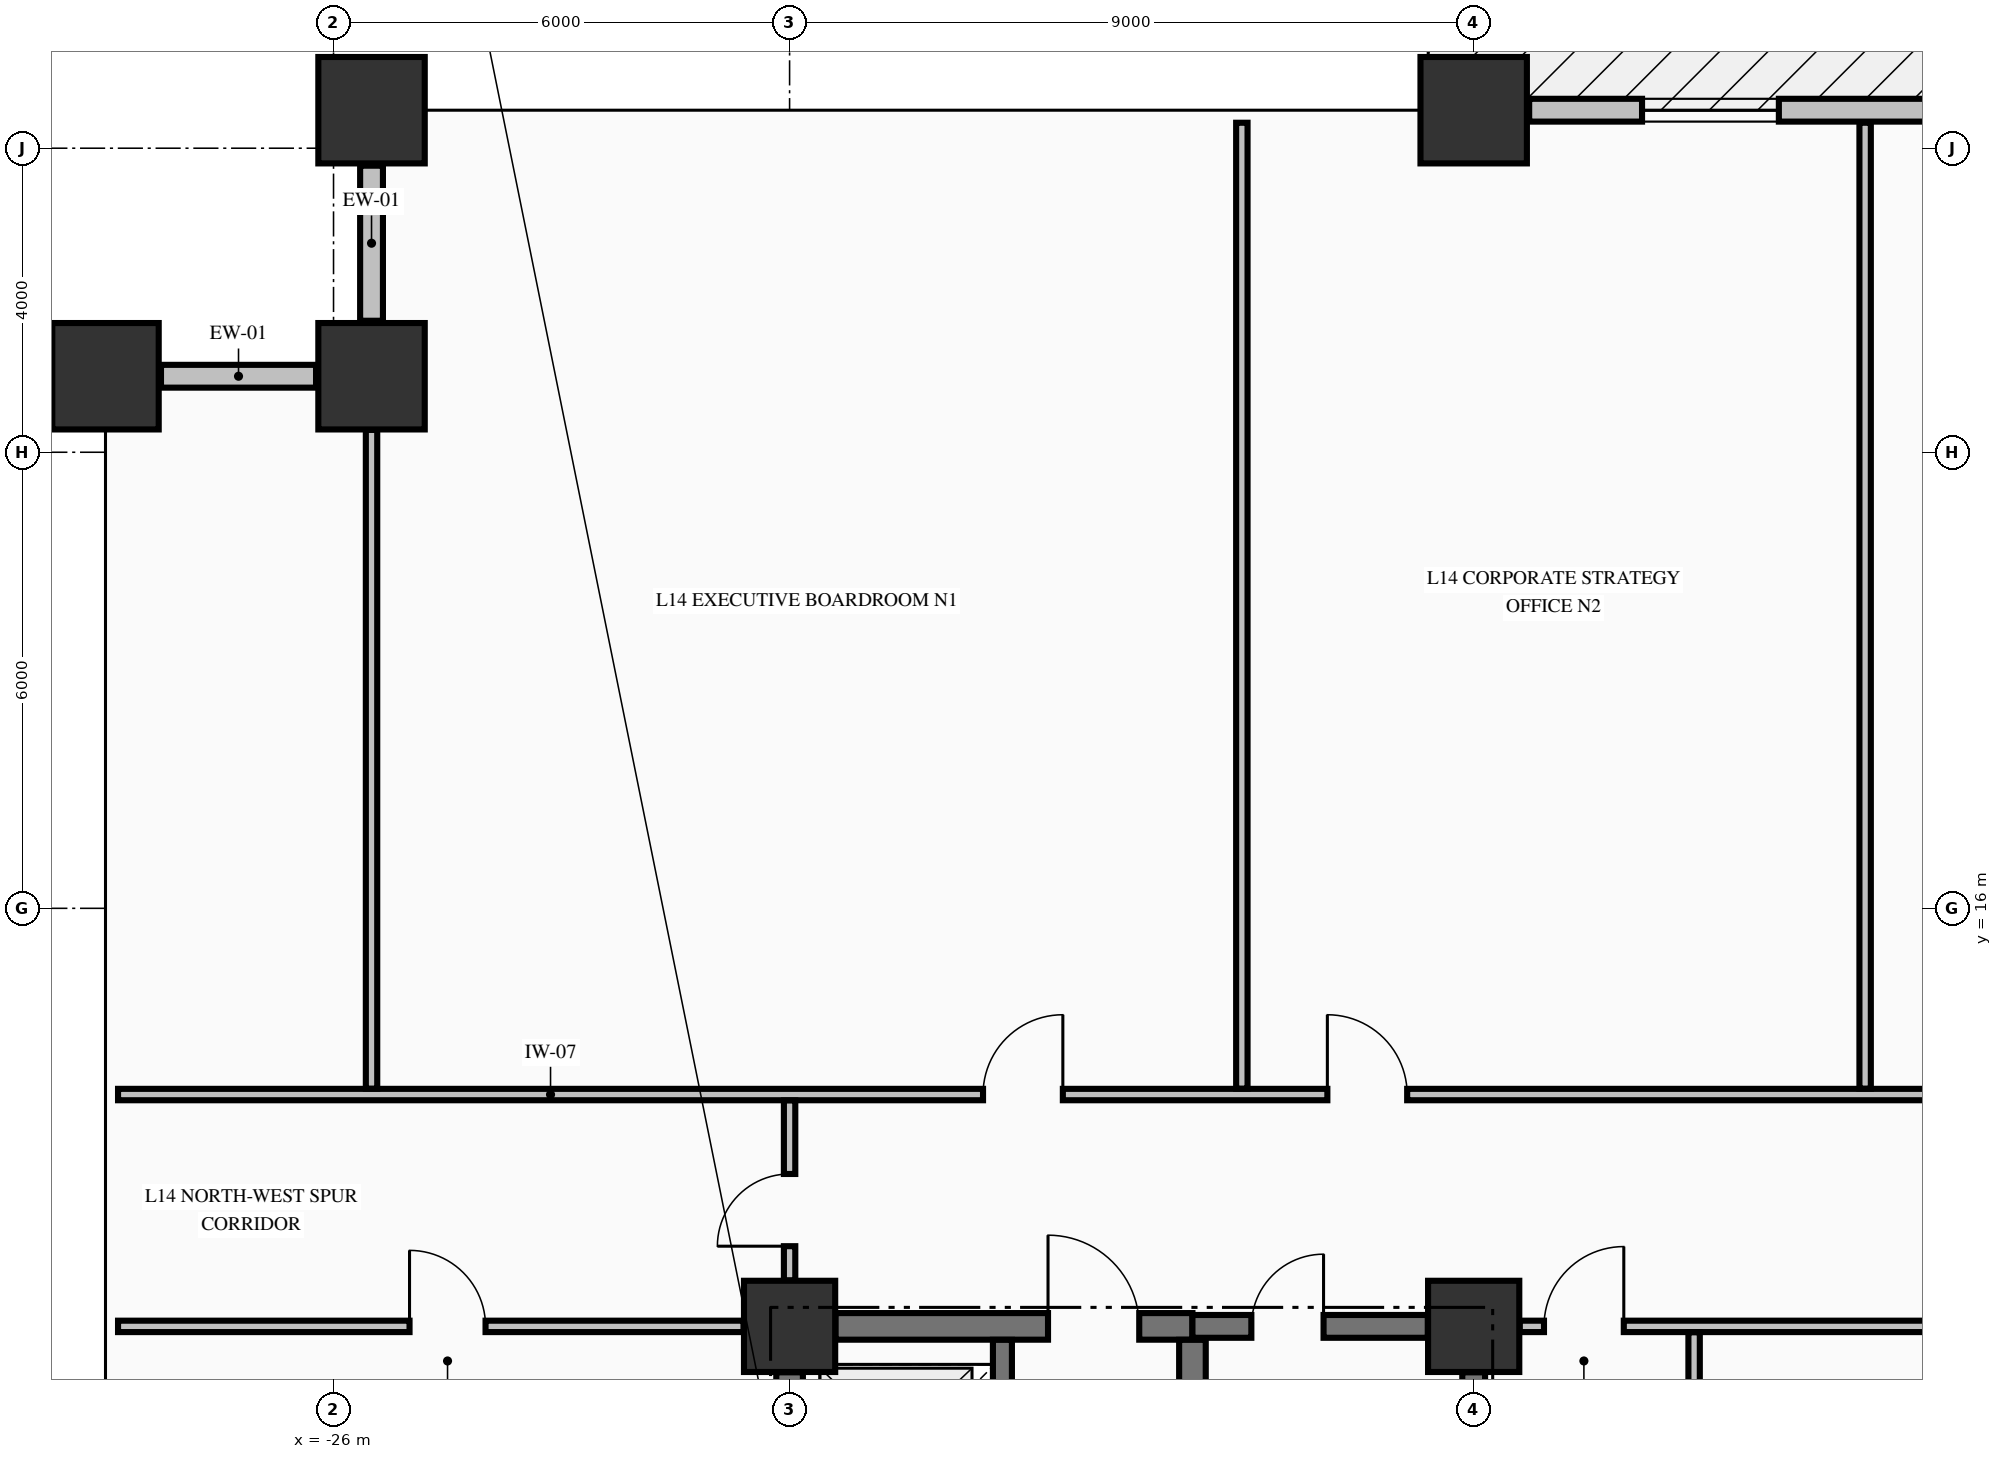
"""IFC4 building model, lengths in metres.
Left out: names, types, materials, properties, quantities, classifications, styles, units other than length and angle.
Written with IfcOpenShell. Run it as: python <this file> out.ifc"""

import sys

from ifc_helpers import new_model, si_unit, direction, frame, frame_2d, origin, origin_2d, place, context, subcontext, project, spatial, rectangle, extrude, element, fill, save


model = new_model("IFC4")
c1 = context("Model", 3, precision=1e-05, world=origin(), true_north=direction((0.0, 1.0)))
c2 = subcontext(c1, "Body", "Model", "MODEL_VIEW")
j1 = project(units=[si_unit("LENGTHUNIT", "METRE"), si_unit("PLANEANGLEUNIT", "RADIAN")], contexts=[c1])
p1 = place(None, origin())
s1 = spatial("IfcSite", under=j1, at=p1, CompositionType="ELEMENT")
p2 = place(p1, origin())
s2 = spatial("IfcBuilding", under=s1, at=p2, CompositionType="ELEMENT")
p3 = place(p2, frame((0.0, 0.0, 60.76)))
s3 = spatial("IfcBuildingStorey", under=s2, at=p3, CompositionType="ELEMENT", Elevation=60.76)
for number, where, z_axis, x_axis in (
    (1, (-25.5, 26.5, -0.3), (0.0, 0.0, 1.0), (1.0, 0.0, 0.0)),
    (2, (-11.0, 26.5, -0.3), (0.0, 0.0, 1.0), (1.0, 0.0, 0.0)),
    (3, (-29.0, 23.0, -0.3), (0.0, 0.0, 1.0), (1.0, 0.0, 0.0)),
    (4, (-25.5, 23.0, -0.3), (0.0, 0.0, 1.0), (1.0, 0.0, 0.0)),
):
    element("IfcColumn", number, at=place(p3, frame(where, z_axis=z_axis, x_axis=x_axis)), inside=s3, PredefinedType="COLUMN", context=c2, shape_type="SweptSolid", body=[
        extrude(rectangle(XDim=1.4, YDim=1.4, at=origin_2d()), origin(), (0.0, 0.0, 1.0), 3.62),
    ])
for number, where, z_axis, x_axis in (
    (5, (-20.0, 10.5, -0.3), (0.0, 0.0, 1.0), (1.0, 0.0, 0.0)),
    (6, (-11.0, 10.5, -0.3), (0.0, 0.0, 1.0), (1.0, 0.0, 0.0)),
):
    element("IfcColumn", number, at=place(p3, frame(where, z_axis=z_axis, x_axis=x_axis)), inside=s3, PredefinedType="COLUMN", context=c2, shape_type="SweptSolid", body=[
        extrude(rectangle(XDim=1.2, YDim=1.2, at=origin_2d()), origin(), (0.0, 0.0, 1.0), 3.62),
    ])
for number, where, z_axis, x_axis in (
    (7, (-25.5, 25.77, 0.0), (0.0, 0.0, 1.0), (0.0, -1.0, 0.0)),
    (8, (-26.23, 23.0, 0.0), (0.0, 0.0, 1.0), (-1.0, 0.0, 0.0)),
):
    element("IfcWall", number, at=place(p3, frame(where, z_axis=z_axis, x_axis=x_axis)), inside=s3, PredefinedType="STANDARD", context=c2, shape_type="SweptSolid", body=[
        extrude(rectangle(XDim=2.04, YDim=0.3, at=frame_2d((1.02, 0.0))), origin(), (0.0, 0.0, 1.0), 1.512),
    ])
p4 = place(p3, frame((-0.73, 26.5, 0.0), z_axis=(0.0, 0.0, 1.0), x_axis=(-1.0, 0.0, 0.0)))
e9 = element("IfcWall", 9, at=p4, inside=s3, PredefinedType="STANDARD", context=c2, shape_type="SweptSolid", body=[
    extrude(rectangle(XDim=9.54, YDim=0.3, at=frame_2d((4.77, 0.0))), origin(), (0.0, 0.0, 1.0), 2.712),
])
p5 = place(p4, frame((0.535, 0.0, 0.0)))
e10 = element("IfcOpeningElement", 10, at=p5, cuts=e9, PredefinedType="OPENING", context=c2, shape_type="SweptSolid", body=[
    extrude(rectangle(XDim=1.1, YDim=2.15, at=frame_2d((0.55, 1.075))), frame((0.0, 0.16, 0.0), z_axis=(0.0, -1.0, 0.0), x_axis=(1.0, 0.0, 0.0)), (0.0, 0.0, 1.0), 0.32),
])
p6 = place(p4, frame((6.255, 0.0, 0.78)))
e11 = element("IfcOpeningElement", 11, at=p6, cuts=e9, PredefinedType="OPENING", context=c2, shape_type="SweptSolid", body=[
    extrude(rectangle(XDim=1.8, YDim=1.72, at=frame_2d((0.9, 0.86))), frame((0.0, 0.16, 0.0), z_axis=(0.0, -1.0, 0.0), x_axis=(1.0, 0.0, 0.0)), (0.0, 0.0, 1.0), 0.32),
])
p7 = place(p3, frame((-19.396, 10.5, 0.0), z_axis=(0.0, 0.0, 1.0), x_axis=(1.0, 0.0, 0.0)))
e12 = element("IfcWall", 12, at=p7, inside=s3, PredefinedType="SHEAR", context=c2, shape_type="SweptSolid", body=[
    extrude(rectangle(XDim=4.696, YDim=0.35, at=frame_2d((2.348, 0.0))), origin(), (0.0, 0.0, 1.0), 3.32),
])
p8 = place(p7, frame((2.796, 0.0, 0.0)))
e13 = element("IfcOpeningElement", 13, at=p8, cuts=e12, PredefinedType="OPENING", context=c2, shape_type="SweptSolid", body=[
    extrude(rectangle(XDim=1.2, YDim=2.15, at=frame_2d((0.6, 1.075))), frame((0.0, 0.185, 0.0), z_axis=(0.0, -1.0, 0.0), x_axis=(1.0, 0.0, 0.0)), (0.0, 0.0, 1.0), 0.37),
])
p9 = place(p3, frame((-14.7, 10.5, 0.0), z_axis=(0.0, 0.0, 1.0), x_axis=(1.0, 0.0, 0.0)))
e14 = element("IfcWall", 14, at=p9, inside=s3, PredefinedType="SHEAR", context=c2, shape_type="SweptSolid", body=[
    extrude(rectangle(XDim=3.096, YDim=0.3, at=frame_2d((1.548, 0.0))), origin(), (0.0, 0.0, 1.0), 3.32),
])
p10 = place(p9, frame((0.775, 0.0, 0.0)))
e15 = element("IfcOpeningElement", 15, at=p10, cuts=e14, PredefinedType="OPENING", context=c2, shape_type="SweptSolid", body=[
    extrude(rectangle(XDim=0.95, YDim=2.15, at=frame_2d((0.475, 1.075))), frame((0.0, 0.16, 0.0), z_axis=(0.0, -1.0, 0.0), x_axis=(1.0, 0.0, 0.0)), (0.0, 0.0, 1.0), 0.32),
])
p11 = place(p3, frame((-28.835, 10.5, 0.0), z_axis=(0.0, 0.0, 1.0), x_axis=(1.0, 0.0, 0.0)))
e16 = element("IfcWall", 16, at=p11, inside=s3, PredefinedType="PARTITIONING", context=c2, shape_type="SweptSolid", body=[
    extrude(rectangle(XDim=8.229, YDim=0.15, at=frame_2d((4.115, 0.0))), origin(), (0.0, 0.0, 1.0), 3.32),
])
p12 = place(p11, frame((3.835, 0.0, 0.0)))
e17 = element("IfcOpeningElement", 17, at=p12, cuts=e16, PredefinedType="OPENING", context=c2, shape_type="SweptSolid", body=[
    extrude(rectangle(XDim=1.0, YDim=2.15, at=frame_2d((0.5, 1.075))), frame((0.0, 0.085, 0.0), z_axis=(0.0, -1.0, 0.0), x_axis=(1.0, 0.0, 0.0)), (0.0, 0.0, 1.0), 0.17),
])
p13 = place(p3, frame((-10.394, 10.5, 0.0), z_axis=(0.0, 0.0, 1.0), x_axis=(1.0, 0.0, 0.0)))
e18 = element("IfcWall", 18, at=p13, inside=s3, PredefinedType="PARTITIONING", context=c2, shape_type="SweptSolid", body=[
    extrude(rectangle(XDim=20.788, YDim=0.15, at=frame_2d((10.394, 0.0))), origin(), (0.0, 0.0, 1.0), 3.32),
])
p14 = place(p13, frame((0.319, 0.0, 0.0)))
e19 = element("IfcOpeningElement", 19, at=p14, cuts=e18, PredefinedType="OPENING", context=c2, shape_type="SweptSolid", body=[
    extrude(rectangle(XDim=1.05, YDim=2.15, at=frame_2d((0.525, 1.075))), frame((0.0, 0.085, 0.0), z_axis=(0.0, -1.0, 0.0), x_axis=(1.0, 0.0, 0.0)), (0.0, 0.0, 1.0), 0.17),
])
p15 = place(p13, frame((19.419, 0.0, 0.0)))
e20 = element("IfcOpeningElement", 20, at=p15, cuts=e18, PredefinedType="OPENING", context=c2, shape_type="SweptSolid", body=[
    extrude(rectangle(XDim=1.05, YDim=2.15, at=frame_2d((0.525, 1.075))), frame((0.0, 0.085, 0.0), z_axis=(0.0, -1.0, 0.0), x_axis=(1.0, 0.0, 0.0)), (0.0, 0.0, 1.0), 0.17),
])
p16 = place(p3, frame((-28.835, 13.55, 0.0), z_axis=(0.0, 0.0, 1.0), x_axis=(1.0, 0.0, 0.0)))
e21 = element("IfcWall", 21, at=p16, inside=s3, PredefinedType="PARTITIONING", context=c2, shape_type="SweptSolid", body=[
    extrude(rectangle(XDim=52.67, YDim=0.15, at=frame_2d((26.335, 0.0))), origin(), (0.0, 0.0, 1.0), 3.32),
])
p17 = place(p16, frame((11.38, 0.0, 0.0)))
e22 = element("IfcOpeningElement", 22, at=p17, cuts=e21, PredefinedType="OPENING", context=c2, shape_type="SweptSolid", body=[
    extrude(rectangle(XDim=1.05, YDim=2.15, at=frame_2d((0.525, 1.075))), frame((0.0, 0.085, 0.0), z_axis=(0.0, -1.0, 0.0), x_axis=(1.0, 0.0, 0.0)), (0.0, 0.0, 1.0), 0.17),
])
p18 = place(p16, frame((15.91, 0.0, 0.0)))
e23 = element("IfcOpeningElement", 23, at=p18, cuts=e21, PredefinedType="OPENING", context=c2, shape_type="SweptSolid", body=[
    extrude(rectangle(XDim=1.05, YDim=2.15, at=frame_2d((0.525, 1.075))), frame((0.0, 0.085, 0.0), z_axis=(0.0, -1.0, 0.0), x_axis=(1.0, 0.0, 0.0)), (0.0, 0.0, 1.0), 0.17),
])
p19 = place(p16, frame((26.66, 0.0, 0.0)))
e24 = element("IfcOpeningElement", 24, at=p19, cuts=e21, PredefinedType="OPENING", context=c2, shape_type="SweptSolid", body=[
    extrude(rectangle(XDim=1.05, YDim=2.15, at=frame_2d((0.525, 1.075))), frame((0.0, 0.085, 0.0), z_axis=(0.0, -1.0, 0.0), x_axis=(1.0, 0.0, 0.0)), (0.0, 0.0, 1.0), 0.17),
])
p20 = place(p16, frame((35.56, 0.0, 0.0)))
e25 = element("IfcOpeningElement", 25, at=p20, cuts=e21, PredefinedType="OPENING", context=c2, shape_type="SweptSolid", body=[
    extrude(rectangle(XDim=1.05, YDim=2.15, at=frame_2d((0.525, 1.075))), frame((0.0, 0.085, 0.0), z_axis=(0.0, -1.0, 0.0), x_axis=(1.0, 0.0, 0.0)), (0.0, 0.0, 1.0), 0.17),
])
p21 = place(p16, frame((44.19, 0.0, 0.0)))
e26 = element("IfcOpeningElement", 26, at=p21, cuts=e21, PredefinedType="OPENING", context=c2, shape_type="SweptSolid", body=[
    extrude(rectangle(XDim=1.05, YDim=2.15, at=frame_2d((0.525, 1.075))), frame((0.0, 0.085, 0.0), z_axis=(0.0, -1.0, 0.0), x_axis=(1.0, 0.0, 0.0)), (0.0, 0.0, 1.0), 0.17),
])
p22 = place(p3, frame((-20.0, 7.727, 0.0), z_axis=(0.0, 0.0, 1.0), x_axis=(0.0, 1.0, 0.0)))
e27 = element("IfcWall", 27, at=p22, inside=s3, PredefinedType="SHEAR", context=c2, shape_type="SweptSolid", body=[
    extrude(rectangle(XDim=2.169, YDim=0.35, at=frame_2d((1.084, 0.0))), origin(), (0.0, 0.0, 1.0), 3.32),
])
p23 = place(p3, frame((-17.2, 7.727, 0.0), z_axis=(0.0, 0.0, 1.0), x_axis=(0.0, 1.0, 0.0)))
e28 = element("IfcWall", 28, at=p23, inside=s3, PredefinedType="SOLIDWALL", context=c2, shape_type="SweptSolid", body=[
    extrude(rectangle(XDim=2.596, YDim=0.25, at=frame_2d((1.298, 0.0))), origin(), (0.0, 0.0, 1.0), 3.32),
])
p24 = place(p23, frame((0.773, 0.0, 0.0)))
e29 = element("IfcOpeningElement", 29, at=p24, cuts=e28, PredefinedType="OPENING", context=c2, shape_type="SweptSolid", body=[
    extrude(rectangle(XDim=1.1, YDim=2.2, at=frame_2d((0.55, 1.1))), frame((0.0, 0.135, 0.0), z_axis=(0.0, -1.0, 0.0), x_axis=(1.0, 0.0, 0.0)), (0.0, 0.0, 1.0), 0.27),
])
p25 = place(p3, frame((-14.7, 5.852, 0.0), z_axis=(0.0, 0.0, 1.0), x_axis=(0.0, 1.0, 0.0)))
e30 = element("IfcWall", 30, at=p25, inside=s3, PredefinedType="SHEAR", context=c2, shape_type="SweptSolid", body=[
    extrude(rectangle(XDim=4.471, YDim=0.35, at=frame_2d((2.235, 0.0))), origin(), (0.0, 0.0, 1.0), 3.32),
])
p26 = place(p3, frame((-11.0, 5.852, 0.0), z_axis=(0.0, 0.0, 1.0), x_axis=(0.0, 1.0, 0.0)))
e31 = element("IfcWall", 31, at=p26, inside=s3, PredefinedType="SHEAR", context=c2, shape_type="SweptSolid", body=[
    extrude(rectangle(XDim=4.044, YDim=0.3, at=frame_2d((2.022, 0.0))), origin(), (0.0, 0.0, 1.0), 3.32),
])
p27 = place(p3, frame((-25.5, 13.628, 0.0), z_axis=(0.0, 0.0, 1.0), x_axis=(0.0, 1.0, 0.0)))
e32 = element("IfcWall", 32, at=p27, inside=s3, PredefinedType="PARTITIONING", context=c2, shape_type="SweptSolid", body=[
    extrude(rectangle(XDim=8.666, YDim=0.15, at=frame_2d((4.333, 0.0))), origin(), (0.0, 0.0, 1.0), 3.32),
])
p28 = place(p3, frame((-20.0, 11.106, 0.0), z_axis=(0.0, 0.0, 1.0), x_axis=(0.0, 1.0, 0.0)))
e33 = element("IfcWall", 33, at=p28, inside=s3, PredefinedType="PARTITIONING", context=c2, shape_type="SweptSolid", body=[
    extrude(rectangle(XDim=2.366, YDim=0.15, at=frame_2d((1.183, 0.0))), origin(), (0.0, 0.0, 1.0), 2.66),
])
p29 = place(p28, frame((0.449, 0.0, 0.0)))
e34 = element("IfcOpeningElement", 34, at=p29, cuts=e33, PredefinedType="OPENING", context=c2, shape_type="SweptSolid", body=[
    extrude(rectangle(XDim=0.95, YDim=2.15, at=frame_2d((0.475, 1.075))), frame((0.0, 0.085, 0.0), z_axis=(0.0, -1.0, 0.0), x_axis=(1.0, 0.0, 0.0)), (0.0, 0.0, 1.0), 0.17),
])
p30 = place(p3, frame((-14.05, 13.628, 0.0), z_axis=(0.0, 0.0, 1.0), x_axis=(0.0, 1.0, 0.0)))
e35 = element("IfcWall", 35, at=p30, inside=s3, PredefinedType="PARTITIONING", context=c2, shape_type="SweptSolid", body=[
    extrude(rectangle(XDim=12.707, YDim=0.15, at=frame_2d((6.354, 0.0))), origin(), (0.0, 0.0, 1.0), 3.32),
])
p31 = place(p3, frame((-8.1, -3.897, 0.0), z_axis=(0.0, 0.0, 1.0), x_axis=(0.0, 1.0, 0.0)))
e36 = element("IfcWall", 36, at=p31, inside=s3, PredefinedType="PARTITIONING", context=c2, shape_type="SweptSolid", body=[
    extrude(rectangle(XDim=14.319, YDim=0.15, at=frame_2d((7.16, 0.0))), origin(), (0.0, 0.0, 1.0), 3.32),
])
p32 = place(p31, frame((6.622, 0.0, 0.0)))
e37 = element("IfcOpeningElement", 37, at=p32, cuts=e36, PredefinedType="OPENING", context=c2, shape_type="SweptSolid", body=[
    extrude(rectangle(XDim=1.05, YDim=2.15, at=frame_2d((0.525, 1.075))), frame((0.0, 0.085, 0.0), z_axis=(0.0, -1.0, 0.0), x_axis=(1.0, 0.0, 0.0)), (0.0, 0.0, 1.0), 0.17),
])
p33 = place(p3, frame((-5.85, 13.628, 0.0), z_axis=(0.0, 0.0, 1.0), x_axis=(0.0, 1.0, 0.0)))
e38 = element("IfcWall", 38, at=p33, inside=s3, PredefinedType="PARTITIONING", context=c2, shape_type="SweptSolid", body=[
    extrude(rectangle(XDim=12.707, YDim=0.15, at=frame_2d((6.354, 0.0))), origin(), (0.0, 0.0, 1.0), 3.32),
])
p34 = place(p6, origin())
e39 = element("IfcWindow", 39, at=p34, inside=s3, PartitioningType="SINGLE_PANEL", PredefinedType="WINDOW", context=c2, shape_type="SweptSolid", body=[
    extrude(rectangle(XDim=1.8, YDim=1.72, at=frame_2d((0.9, 0.86))), frame((0.0, 0.03, 0.0), z_axis=(0.0, -1.0, 0.0), x_axis=(1.0, 0.0, 0.0)), (0.0, 0.0, 1.0), 0.06),
])
fill(e11, e39)
p35 = place(p10, origin())
e40 = element("IfcDoor", 40, at=p35, inside=s3, OperationType="SINGLE_SWING_RIGHT", PredefinedType="DOOR", context=c2, shape_type="SweptSolid", body=[
    extrude(rectangle(XDim=0.95, YDim=2.15, at=frame_2d((0.475, 1.075))), frame((0.0, 0.025, 0.0), z_axis=(0.0, -1.0, 0.0), x_axis=(1.0, 0.0, 0.0)), (0.0, 0.0, 1.0), 0.05),
])
fill(e15, e40)
p36 = place(p8, origin())
e41 = element("IfcDoor", 41, at=p36, inside=s3, OperationType="SINGLE_SWING_LEFT", PredefinedType="DOOR", context=c2, shape_type="SweptSolid", body=[
    extrude(rectangle(XDim=1.2, YDim=2.15, at=frame_2d((0.6, 1.075))), frame((0.0, 0.025, 0.0), z_axis=(0.0, -1.0, 0.0), x_axis=(1.0, 0.0, 0.0)), (0.0, 0.0, 1.0), 0.05),
])
fill(e13, e41)
p37 = place(p14, origin())
e42 = element("IfcDoor", 42, at=p37, inside=s3, OperationType="SINGLE_SWING_RIGHT", PredefinedType="DOOR", context=c2, shape_type="SweptSolid", body=[
    extrude(rectangle(XDim=1.05, YDim=2.15, at=frame_2d((0.525, 1.075))), frame((0.0, 0.025, 0.0), z_axis=(0.0, -1.0, 0.0), x_axis=(1.0, 0.0, 0.0)), (0.0, 0.0, 1.0), 0.05),
])
fill(e19, e42)
p38 = place(p17, origin())
e43 = element("IfcDoor", 43, at=p38, inside=s3, OperationType="SINGLE_SWING_RIGHT", PredefinedType="DOOR", context=c2, shape_type="SweptSolid", body=[
    extrude(rectangle(XDim=1.05, YDim=2.15, at=frame_2d((0.525, 1.075))), frame((0.0, 0.025, 0.0), z_axis=(0.0, -1.0, 0.0), x_axis=(1.0, 0.0, 0.0)), (0.0, 0.0, 1.0), 0.05),
])
fill(e22, e43)
p39 = place(p18, origin())
e44 = element("IfcDoor", 44, at=p39, inside=s3, OperationType="SINGLE_SWING_LEFT", PredefinedType="DOOR", context=c2, shape_type="SweptSolid", body=[
    extrude(rectangle(XDim=1.05, YDim=2.15, at=frame_2d((0.525, 1.075))), frame((0.0, 0.025, 0.0), z_axis=(0.0, -1.0, 0.0), x_axis=(1.0, 0.0, 0.0)), (0.0, 0.0, 1.0), 0.05),
])
fill(e23, e44)
p40 = place(p29, origin())
e45 = element("IfcDoor", 45, at=p40, inside=s3, OperationType="SINGLE_SWING_LEFT", PredefinedType="DOOR", context=c2, shape_type="SweptSolid", body=[
    extrude(rectangle(XDim=0.95, YDim=2.15, at=frame_2d((0.475, 1.075))), frame((0.0, 0.025, 0.0), z_axis=(0.0, -1.0, 0.0), x_axis=(1.0, 0.0, 0.0)), (0.0, 0.0, 1.0), 0.05),
])
fill(e34, e45)
p41 = place(p12, origin())
e46 = element("IfcDoor", 46, at=p41, inside=s3, OperationType="SINGLE_SWING_LEFT", PredefinedType="DOOR", context=c2, shape_type="SweptSolid", body=[
    extrude(rectangle(XDim=1.0, YDim=2.15, at=frame_2d((0.5, 1.075))), frame((0.0, 0.025, 0.0), z_axis=(0.0, -1.0, 0.0), x_axis=(1.0, 0.0, 0.0)), (0.0, 0.0, 1.0), 0.05),
])
fill(e17, e46)
save(model, sys.argv[1])
